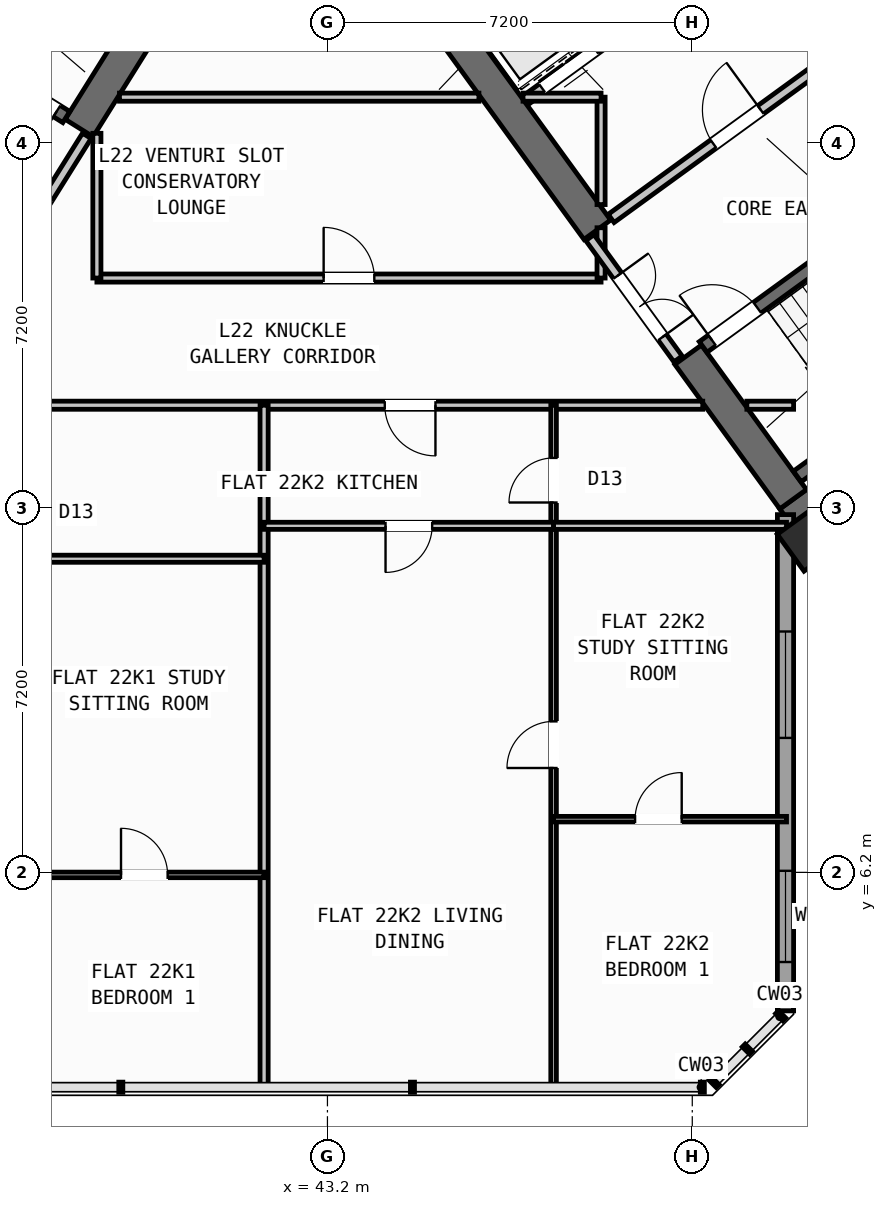
"""IFC4 building model, lengths in metres.
Left out: names, types, materials, properties, quantities, classifications, styles, units other than length and angle.
Written with IfcOpenShell. Run it as: python <this file> out.ifc"""

import sys

from ifc_helpers import new_model, si_unit, direction, frame, frame_2d, origin, origin_2d, place, context, subcontext, project, spatial, rectangle, hollow_rectangle, extrude, source, transform, mapped, element, fill, save


model = new_model("IFC4")
c1 = context("Model", 3, precision=1e-05, world=origin(), true_north=direction((0.0, 1.0)))
c2 = subcontext(c1, "Body", "Model", "MODEL_VIEW")
j1 = project(units=[si_unit("LENGTHUNIT", "METRE"), si_unit("PLANEANGLEUNIT", "RADIAN")], contexts=[c1])
p1 = place(None, origin())
s1 = spatial("IfcSite", under=j1, at=p1, CompositionType="ELEMENT")
p2 = place(p1, origin())
s2 = spatial("IfcBuilding", under=s1, at=p2, CompositionType="ELEMENT")
p3 = place(p2, frame((0.0, 0.0, 90.0)))
s3 = spatial("IfcBuildingStorey", under=s2, at=p3, CompositionType="ELEMENT", Elevation=90.0)
p4 = place(p3, frame((40.168, 23.88, 0.0), z_axis=(0.0, 0.0, 1.0), x_axis=(-0.529893103397, -0.8480644427, 0.0)))
e1 = element("IfcWall", 1, at=p4, inside=s3, PredefinedType="SHEAR", context=c2, shape_type="SweptSolid", body=[
    extrude(rectangle(XDim=3.525, YDim=0.65, at=frame_2d((1.763, 0.0))), origin(), (0.0, 0.0, 1.0), 3.35),
])
p5 = place(p3, frame((52.318, 13.11, 0.0), z_axis=(0.0, 0.0, 1.0), x_axis=(0.809019445368, 0.587781878776, 0.0)))
e2 = element("IfcWall", 2, at=p5, inside=s3, PredefinedType="SHEAR", context=c2, shape_type="SweptSolid", body=[
    extrude(rectangle(XDim=12.44, YDim=0.65, at=frame_2d((6.22, 0.0))), origin(), (0.0, 0.0, 1.0), 3.35),
])
p6 = place(p3, frame((52.39, 13.564, 0.0), z_axis=(0.0, 0.0, 1.0), x_axis=(-0.58779688989, 0.809008539037, 0.0)))
e3 = element("IfcWall", 3, at=p6, inside=s3, PredefinedType="SHEAR", context=c2, shape_type="SweptSolid", body=[
    extrude(rectangle(XDim=3.525, YDim=0.65, at=frame_2d((1.763, 0.0))), origin(), (0.0, 0.0, 1.0), 3.35),
])
p7 = place(p3, frame((48.526, 18.884, 0.0), z_axis=(0.0, 0.0, 1.0), x_axis=(-0.58777996584, 0.809020835181, 0.0)))
e4 = element("IfcWall", 4, at=p7, inside=s3, PredefinedType="SHEAR", context=c2, shape_type="SweptSolid", body=[
    extrude(rectangle(XDim=6.375, YDim=0.65, at=frame_2d((3.188, 0.0))), origin(), (0.0, 0.0, 1.0), 3.35),
])
m1 = source(origin(), c2, "Body", "SweptSolid", [
    extrude(hollow_rectangle(XDim=0.9, YDim=0.9, WallThickness=0.036, at=origin_2d()), origin(), (0.0, 0.0, 1.0), 3.6),
])
p8 = place(p3, frame((52.705, 12.773, 0.0), z_axis=(0.0, 0.0, 1.0), x_axis=(0.809016994375, 0.587785252292, 0.0)))
e5 = element("IfcColumn", 5, at=p8, inside=s3, PredefinedType="COLUMN", context=c2, shape_type="MappedRepresentation", body=[
    mapped(m1, transform((0.0, 0.0, 0.0), scale=1.0)),
])
p9 = place(p3, frame((52.24, 13.261, 0.0), z_axis=(0.0, 0.0, 1.0), x_axis=(0.0, -1.0, 0.0)))
e6 = element("IfcWall", 6, at=p9, inside=s3, PredefinedType="STANDARD", context=c2, shape_type="SweptSolid", body=[
    extrude(rectangle(XDim=9.795, YDim=0.32, at=frame_2d((4.897, 0.0))), origin(), (0.0, 0.0, 1.0), 3.35),
])
p10 = place(p9, frame((2.307, 0.0, 0.8)))
e7 = element("IfcOpeningElement", 7, at=p10, cuts=e6, PredefinedType="OPENING", context=c2, shape_type="SweptSolid", body=[
    extrude(rectangle(XDim=2.1, YDim=1.55, at=frame_2d((1.05, 0.775))), frame((0.0, 0.17, 0.0), z_axis=(0.0, -1.0, 0.0), x_axis=(1.0, 0.0, 0.0)), (0.0, 0.0, 1.0), 0.34),
])
p11 = place(p9, frame((7.03, 0.0, 0.85)))
e8 = element("IfcOpeningElement", 8, at=p11, cuts=e6, PredefinedType="OPENING", context=c2, shape_type="SweptSolid", body=[
    extrude(rectangle(XDim=1.8, YDim=1.5, at=frame_2d((0.9, 0.75))), frame((0.0, 0.17, 0.0), z_axis=(0.0, -1.0, 0.0), x_axis=(1.0, 0.0, 0.0)), (0.0, 0.0, 1.0), 0.34),
])
p12 = place(p3, frame((38.046, 21.108, 0.0), z_axis=(0.0, 0.0, 1.0), x_axis=(-0.848054434086, 0.529909121291, 0.0)))
e9 = element("IfcWall", 9, at=p12, inside=s3, PredefinedType="SHEAR", context=c2, shape_type="SweptSolid", body=[
    extrude(rectangle(XDim=7.33, YDim=0.26, at=frame_2d((3.665, 0.0))), origin(), (0.0, 0.0, 1.0), 3.35),
])
p13 = place(p12, frame((0.22, 0.0, 0.0)))
e10 = element("IfcOpeningElement", 10, at=p13, cuts=e9, PredefinedType="OPENING", context=c2, shape_type="SweptSolid", body=[
    extrude(rectangle(XDim=1.1, YDim=2.1, at=frame_2d((0.55, 1.05))), frame((0.0, 0.14, 0.0), z_axis=(0.0, -1.0, 0.0), x_axis=(1.0, 0.0, 0.0)), (0.0, 0.0, 1.0), 0.28),
])
p14 = place(p3, frame((52.472, 14.013, 0.0), z_axis=(0.0, 0.0, 1.0), x_axis=(0.809028366311, 0.587769599847, 0.0)))
e11 = element("IfcWall", 11, at=p14, inside=s3, PredefinedType="SHEAR", context=c2, shape_type="SweptSolid", body=[
    extrude(rectangle(XDim=7.33, YDim=0.26, at=frame_2d((3.665, 0.0))), origin(), (0.0, 0.0, 1.0), 3.35),
])
p15 = place(p3, frame((50.615, 16.57, 0.0), z_axis=(0.0, 0.0, 1.0), x_axis=(0.809028366311, 0.587769599847, 0.0)))
e12 = element("IfcWall", 12, at=p15, inside=s3, PredefinedType="SHEAR", context=c2, shape_type="SweptSolid", body=[
    extrude(rectangle(XDim=7.33, YDim=0.26, at=frame_2d((3.665, 0.0))), origin(), (0.0, 0.0, 1.0), 3.35),
])
p16 = place(p15, frame((0.22, 0.0, 0.0)))
e13 = element("IfcOpeningElement", 13, at=p16, cuts=e12, PredefinedType="OPENING", context=c2, shape_type="SweptSolid", body=[
    extrude(rectangle(XDim=1.1, YDim=2.1, at=frame_2d((0.55, 1.05))), frame((0.0, 0.14, 0.0), z_axis=(0.0, -1.0, 0.0), x_axis=(1.0, 0.0, 0.0)), (0.0, 0.0, 1.0), 0.28),
])
p17 = place(p3, frame((47.106, 21.437, 0.0), z_axis=(0.0, 0.0, 1.0), x_axis=(0.809012514015, 0.58779141893, 0.0)))
e14 = element("IfcWall", 14, at=p17, inside=s3, PredefinedType="STANDARD", context=c2, shape_type="SweptSolid", body=[
    extrude(rectangle(XDim=3.398, YDim=0.2, at=frame_2d((1.699, 0.0))), origin(), (0.0, 0.0, 1.0), 3.34),
])
p18 = place(p17, frame((0.408, 0.0, 0.0)))
e15 = element("IfcOpeningElement", 15, at=p18, cuts=e14, PredefinedType="OPENING", context=c2, shape_type="SweptSolid", body=[
    extrude(rectangle(XDim=1.3, YDim=2.2, at=frame_2d((0.65, 1.1))), frame((0.0, 0.11, 0.0), z_axis=(0.0, -1.0, 0.0), x_axis=(1.0, 0.0, 0.0)), (0.0, 0.0, 1.0), 0.22),
])
p19 = place(p3, frame((48.799, 19.107, 0.0), z_axis=(0.0, 0.0, 1.0), x_axis=(0.809012959416, 0.587790805897, 0.0)))
e16 = element("IfcWall", 16, at=p19, inside=s3, PredefinedType="STANDARD", context=c2, shape_type="SweptSolid", body=[
    extrude(rectangle(XDim=5.718, YDim=0.2, at=frame_2d((2.859, 0.0))), origin(), (0.0, 0.0, 1.0), 3.34),
])
p20 = place(p19, frame((2.498, 0.0, 0.0)))
e17 = element("IfcOpeningElement", 17, at=p20, cuts=e16, PredefinedType="OPENING", context=c2, shape_type="SweptSolid", body=[
    extrude(rectangle(XDim=1.15, YDim=2.1, at=frame_2d((0.575, 1.05))), frame((0.0, 0.11, 0.0), z_axis=(0.0, -1.0, 0.0), x_axis=(1.0, 0.0, 0.0)), (0.0, 0.0, 1.0), 0.22),
])
p21 = place(p3, frame((38.451, 20.737, 0.0), z_axis=(0.0, 0.0, 1.0), x_axis=(-0.529924799939, -0.848044637038, 0.0)))
e18 = element("IfcWall", 18, at=p21, inside=s3, PredefinedType="STANDARD", context=c2, shape_type="SweptSolid", body=[
    extrude(rectangle(XDim=2.96, YDim=0.2, at=frame_2d((1.48, 0.0))), origin(), (0.0, 0.0, 1.0), 3.34),
])
p22 = place(p21, frame((1.46, 0.0, 0.0)))
e19 = element("IfcOpeningElement", 19, at=p22, cuts=e18, PredefinedType="OPENING", context=c2, shape_type="SweptSolid", body=[
    extrude(rectangle(XDim=0.86, YDim=2.05, at=frame_2d((0.43, 1.025))), frame((0.0, 0.11, 0.0), z_axis=(0.0, -1.0, 0.0), x_axis=(1.0, 0.0, 0.0)), (0.0, 0.0, 1.0), 0.22),
])
p23 = place(p3, frame((35.296, 15.42, 0.0), z_axis=(0.0, 0.0, 1.0), x_axis=(1.0, 0.0, 0.0)))
e20 = element("IfcWall", 20, at=p23, inside=s3, PredefinedType="PARTITIONING", context=c2, shape_type="SweptSolid", body=[
    extrude(rectangle(XDim=15.311, YDim=0.16, at=frame_2d((7.655, 0.0))), origin(), (0.0, 0.0, 1.0), 3.34),
])
p24 = place(p23, frame((0.615, 0.0, 0.0)))
e21 = element("IfcOpeningElement", 21, at=p24, cuts=e20, PredefinedType="OPENING", context=c2, shape_type="SweptSolid", body=[
    extrude(rectangle(XDim=1.0, YDim=2.1, at=frame_2d((0.5, 1.05))), frame((0.0, 0.09, 0.0), z_axis=(0.0, -1.0, 0.0), x_axis=(1.0, 0.0, 0.0)), (0.0, 0.0, 1.0), 0.18),
])
p25 = place(p23, frame((9.035, 0.0, 0.0)))
e22 = element("IfcOpeningElement", 22, at=p25, cuts=e20, PredefinedType="OPENING", context=c2, shape_type="SweptSolid", body=[
    extrude(rectangle(XDim=1.0, YDim=2.1, at=frame_2d((0.5, 1.05))), frame((0.0, 0.09, 0.0), z_axis=(0.0, -1.0, 0.0), x_axis=(1.0, 0.0, 0.0)), (0.0, 0.0, 1.0), 0.18),
])
p26 = place(p3, frame((51.477, 15.42, 0.0), z_axis=(0.0, 0.0, 1.0), x_axis=(1.0, 0.0, 0.0)))
e23 = element("IfcWall", 23, at=p26, inside=s3, PredefinedType="PARTITIONING", context=c2, shape_type="SweptSolid", body=[
    extrude(rectangle(XDim=0.923, YDim=0.16, at=frame_2d((0.461, 0.0))), origin(), (0.0, 0.0, 1.0), 3.34),
])
p27 = place(p3, frame((38.65, 17.93, 0.0), z_axis=(0.0, 0.0, 1.0), x_axis=(1.0, 0.0, 0.0)))
e24 = element("IfcWall", 24, at=p27, inside=s3, PredefinedType="PARTITIONING", context=c2, shape_type="SweptSolid", body=[
    extrude(rectangle(XDim=9.95, YDim=0.16, at=frame_2d((4.975, 0.0))), origin(), (0.0, 0.0, 1.0), 3.34),
])
p28 = place(p27, frame((4.475, 0.0, 0.0)))
e25 = element("IfcOpeningElement", 25, at=p28, cuts=e24, PredefinedType="OPENING", context=c2, shape_type="SweptSolid", body=[
    extrude(rectangle(XDim=1.0, YDim=2.1, at=frame_2d((0.5, 1.05))), frame((0.0, 0.09, 0.0), z_axis=(0.0, -1.0, 0.0), x_axis=(1.0, 0.0, 0.0)), (0.0, 0.0, 1.0), 0.18),
])
p29 = place(p3, frame((38.65, 17.93, 0.0), z_axis=(0.0, 0.0, 1.0), x_axis=(0.0, 1.0, 0.0)))
e26 = element("IfcWall", 26, at=p29, inside=s3, PredefinedType="PARTITIONING", context=c2, shape_type="SweptSolid", body=[
    extrude(rectangle(XDim=2.857, YDim=0.16, at=frame_2d((1.428, 0.0))), origin(), (0.0, 0.0, 1.0), 3.34),
])
p30 = place(p3, frame((48.6, 17.93, 0.0), z_axis=(0.0, 0.0, 1.0), x_axis=(0.0, 1.0, 0.0)))
e27 = element("IfcWall", 27, at=p30, inside=s3, PredefinedType="PARTITIONING", context=c2, shape_type="SweptSolid", body=[
    extrude(rectangle(XDim=0.993, YDim=0.16, at=frame_2d((0.496, 0.0))), origin(), (0.0, 0.0, 1.0), 3.34),
])
p31 = place(p3, frame((48.6, 19.38, 0.0), z_axis=(0.0, 0.0, 1.0), x_axis=(0.0, 1.0, 0.0)))
e28 = element("IfcWall", 28, at=p31, inside=s3, PredefinedType="PARTITIONING", context=c2, shape_type="SweptSolid", body=[
    extrude(rectangle(XDim=2.12, YDim=0.16, at=frame_2d((1.06, 0.0))), origin(), (0.0, 0.0, 1.0), 3.34),
])
p32 = place(p3, frame((39.095, 21.5, 0.0), z_axis=(0.0, 0.0, 1.0), x_axis=(1.0, 0.0, 0.0)))
e29 = element("IfcWall", 29, at=p32, inside=s3, PredefinedType="PARTITIONING", context=c2, shape_type="SweptSolid", body=[
    extrude(rectangle(XDim=7.094, YDim=0.16, at=frame_2d((3.547, 0.0))), origin(), (0.0, 0.0, 1.0), 3.34),
])
p33 = place(p3, frame((47.06, 21.5, 0.0), z_axis=(0.0, 0.0, 1.0), x_axis=(1.0, 0.0, 0.0)))
e30 = element("IfcWall", 30, at=p33, inside=s3, PredefinedType="PARTITIONING", context=c2, shape_type="SweptSolid", body=[
    extrude(rectangle(XDim=1.54, YDim=0.16, at=frame_2d((0.77, 0.0))), origin(), (0.0, 0.0, 1.0), 3.34),
])
p34 = place(p3, frame((50.119, 16.333, 0.0), z_axis=(0.0, 0.0, 1.0), x_axis=(-0.587749856981, 0.809042709391, 0.0)))
e31 = element("IfcWall", 31, at=p34, inside=s3, PredefinedType="STANDARD", context=c2, shape_type="SweptSolid", body=[
    extrude(rectangle(XDim=2.96, YDim=0.2, at=frame_2d((1.48, 0.0))), origin(), (0.0, 0.0, 1.0), 3.34),
])
p35 = place(p34, frame((0.53, 0.0, 0.0)))
e32 = element("IfcOpeningElement", 32, at=p35, cuts=e31, PredefinedType="OPENING", context=c2, shape_type="SweptSolid", body=[
    extrude(rectangle(XDim=1.5, YDim=2.15, at=frame_2d((0.75, 1.075))), frame((0.0, 0.11, 0.0), z_axis=(0.0, -1.0, 0.0), x_axis=(1.0, 0.0, 0.0)), (0.0, 0.0, 1.0), 0.22),
])
p36 = place(p3, frame((41.95, 1.96, 0.0), z_axis=(0.0, 0.0, 1.0), x_axis=(0.0, 1.0, 0.0)))
e33 = element("IfcWall", 33, at=p36, inside=s3, PredefinedType="PARTITIONING", context=c2, shape_type="SweptSolid", body=[
    extrude(rectangle(XDim=13.46, YDim=0.16, at=frame_2d((6.73, 0.0))), origin(), (0.0, 0.0, 1.0), 3.34),
])
p37 = place(p3, frame((37.222, 12.39, 0.0), z_axis=(0.0, 0.0, 1.0), x_axis=(1.0, 0.0, 0.0)))
e34 = element("IfcWall", 34, at=p37, inside=s3, PredefinedType="PLUMBINGWALL", context=c2, shape_type="SweptSolid", body=[
    extrude(rectangle(XDim=4.728, YDim=0.14, at=frame_2d((2.364, 0.0))), origin(), (0.0, 0.0, 1.0), 2.525),
])
p38 = place(p3, frame((37.222, 6.15, 0.0), z_axis=(0.0, 0.0, 1.0), x_axis=(1.0, 0.0, 0.0)))
e35 = element("IfcWall", 35, at=p38, inside=s3, PredefinedType="PARTITIONING", context=c2, shape_type="SweptSolid", body=[
    extrude(rectangle(XDim=4.728, YDim=0.11, at=frame_2d((2.364, 0.0))), origin(), (0.0, 0.0, 1.0), 3.34),
])
p39 = place(p38, frame((1.904, 0.0, 0.0)))
e36 = element("IfcOpeningElement", 36, at=p39, cuts=e35, PredefinedType="OPENING", context=c2, shape_type="SweptSolid", body=[
    extrude(rectangle(XDim=0.92, YDim=2.08, at=frame_2d((0.46, 1.04))), frame((0.0, 0.065, 0.0), z_axis=(0.0, -1.0, 0.0), x_axis=(1.0, 0.0, 0.0)), (0.0, 0.0, 1.0), 0.13),
])
p40 = place(p3, frame((47.663, 1.96, 0.0), z_axis=(0.0, 0.0, 1.0), x_axis=(0.0, 1.0, 0.0)))
e37 = element("IfcWall", 37, at=p40, inside=s3, PredefinedType="PARTITIONING", context=c2, shape_type="SweptSolid", body=[
    extrude(rectangle(XDim=13.46, YDim=0.11, at=frame_2d((6.73, 0.0))), origin(), (0.0, 0.0, 1.0), 3.34),
])
p41 = place(p40, frame((6.3, 0.0, 0.0)))
e38 = element("IfcOpeningElement", 38, at=p41, cuts=e37, PredefinedType="OPENING", context=c2, shape_type="SweptSolid", body=[
    extrude(rectangle(XDim=0.92, YDim=2.08, at=frame_2d((0.46, 1.04))), frame((0.0, 0.065, 0.0), z_axis=(0.0, -1.0, 0.0), x_axis=(1.0, 0.0, 0.0)), (0.0, 0.0, 1.0), 0.13),
])
p42 = place(p40, frame((11.54, 0.0, 0.0)))
e39 = element("IfcOpeningElement", 39, at=p42, cuts=e37, PredefinedType="OPENING", context=c2, shape_type="SweptSolid", body=[
    extrude(rectangle(XDim=0.88, YDim=2.08, at=frame_2d((0.44, 1.04))), frame((0.0, 0.065, 0.0), z_axis=(0.0, -1.0, 0.0), x_axis=(1.0, 0.0, 0.0)), (0.0, 0.0, 1.0), 0.13),
])
p43 = place(p3, frame((41.95, 13.04, 0.0), z_axis=(0.0, 0.0, 1.0), x_axis=(1.0, 0.0, 0.0)))
e40 = element("IfcWall", 40, at=p43, inside=s3, PredefinedType="PLUMBINGWALL", context=c2, shape_type="SweptSolid", body=[
    extrude(rectangle(XDim=5.713, YDim=0.14, at=frame_2d((2.856, 0.0))), origin(), (0.0, 0.0, 1.0), 3.34),
])
p44 = place(p43, frame((2.396, 0.0, 0.0)))
e41 = element("IfcOpeningElement", 41, at=p44, cuts=e40, PredefinedType="OPENING", context=c2, shape_type="SweptSolid", body=[
    extrude(rectangle(XDim=0.92, YDim=2.08, at=frame_2d((0.46, 1.04))), frame((0.0, 0.08, 0.0), z_axis=(0.0, -1.0, 0.0), x_axis=(1.0, 0.0, 0.0)), (0.0, 0.0, 1.0), 0.16),
])
p45 = place(p3, frame((47.663, 13.04, 0.0), z_axis=(0.0, 0.0, 1.0), x_axis=(1.0, 0.0, 0.0)))
e42 = element("IfcWall", 42, at=p45, inside=s3, PredefinedType="PLUMBINGWALL", context=c2, shape_type="SweptSolid", body=[
    extrude(rectangle(XDim=4.597, YDim=0.14, at=frame_2d((2.298, 0.0))), origin(), (0.0, 0.0, 1.0), 2.525),
])
p46 = place(p3, frame((47.663, 7.25, 0.0), z_axis=(0.0, 0.0, 1.0), x_axis=(1.0, 0.0, 0.0)))
e43 = element("IfcWall", 43, at=p46, inside=s3, PredefinedType="PARTITIONING", context=c2, shape_type="SweptSolid", body=[
    extrude(rectangle(XDim=4.597, YDim=0.11, at=frame_2d((2.298, 0.0))), origin(), (0.0, 0.0, 1.0), 3.34),
])
p47 = place(p46, frame((1.608, 0.0, 0.0)))
e44 = element("IfcOpeningElement", 44, at=p47, cuts=e43, PredefinedType="OPENING", context=c2, shape_type="SweptSolid", body=[
    extrude(rectangle(XDim=0.92, YDim=2.08, at=frame_2d((0.46, 1.04))), frame((0.0, 0.065, 0.0), z_axis=(0.0, -1.0, 0.0), x_axis=(1.0, 0.0, 0.0)), (0.0, 0.0, 1.0), 0.13),
])
m2 = source(origin(), c2, "Body", "SweptSolid", [
    extrude(rectangle(XDim=2.1, YDim=1.55, at=frame_2d((1.05, 0.775))), frame((0.0, 0.03, 0.0), z_axis=(0.0, -1.0, 0.0), x_axis=(1.0, 0.0, 0.0)), (0.0, 0.0, 1.0), 0.06),
])
p48 = place(p10, origin())
e45 = element("IfcWindow", 45, at=p48, inside=s3, PartitioningType="SINGLE_PANEL", PredefinedType="WINDOW", context=c2, shape_type="MappedRepresentation", body=[
    mapped(m2, transform((0.0, 0.0, 0.0), scale=1.0)),
])
fill(e7, e45)
m3 = source(origin(), c2, "Body", "SweptSolid", [
    extrude(rectangle(XDim=1.8, YDim=1.5, at=frame_2d((0.9, 0.75))), frame((0.0, 0.03, 0.0), z_axis=(0.0, -1.0, 0.0), x_axis=(1.0, 0.0, 0.0)), (0.0, 0.0, 1.0), 0.06),
])
p49 = place(p11, origin())
e46 = element("IfcWindow", 46, at=p49, inside=s3, PartitioningType="SINGLE_PANEL", PredefinedType="WINDOW", context=c2, shape_type="MappedRepresentation", body=[
    mapped(m3, transform((0.0, 0.0, 0.0), scale=1.0)),
])
fill(e8, e46)
m4 = source(origin(), c2, "Body", "SweptSolid", [
    extrude(rectangle(XDim=1.1, YDim=2.1, at=frame_2d((0.55, 1.05))), frame((0.0, 0.025, 0.0), z_axis=(0.0, -1.0, 0.0), x_axis=(1.0, 0.0, 0.0)), (0.0, 0.0, 1.0), 0.05),
])
p50 = place(p13, origin())
e47 = element("IfcDoor", 47, at=p50, inside=s3, OperationType="SINGLE_SWING_LEFT", PredefinedType="DOOR", context=c2, shape_type="MappedRepresentation", body=[
    mapped(m4, transform((0.0, 0.0, 0.0), scale=1.0)),
])
fill(e10, e47)
p51 = place(p16, origin())
e48 = element("IfcDoor", 48, at=p51, inside=s3, OperationType="SINGLE_SWING_LEFT", PredefinedType="DOOR", context=c2, shape_type="MappedRepresentation", body=[
    mapped(m4, transform((0.0, 0.0, 0.0), scale=1.0)),
])
fill(e13, e48)
m5 = source(origin(), c2, "Body", "SweptSolid", [
    extrude(rectangle(XDim=1.15, YDim=2.1, at=frame_2d((0.575, 1.05))), frame((0.0, 0.025, 0.0), z_axis=(0.0, -1.0, 0.0), x_axis=(1.0, 0.0, 0.0)), (0.0, 0.0, 1.0), 0.05),
])
p52 = place(p20, origin())
e49 = element("IfcDoor", 49, at=p52, inside=s3, OperationType="SINGLE_SWING_RIGHT", PredefinedType="DOOR", context=c2, shape_type="MappedRepresentation", body=[
    mapped(m5, transform((0.0, 0.0, 0.0), scale=1.0)),
])
fill(e17, e49)
m6 = source(origin(), c2, "Body", "SweptSolid", [
    extrude(rectangle(XDim=1.3, YDim=2.2, at=frame_2d((0.65, 1.1))), frame((0.0, 0.025, 0.0), z_axis=(0.0, -1.0, 0.0), x_axis=(1.0, 0.0, 0.0)), (0.0, 0.0, 1.0), 0.05),
])
p53 = place(p18, origin())
e50 = element("IfcDoor", 50, at=p53, inside=s3, OperationType="DOUBLE_DOOR_SLIDING", PredefinedType="DOOR", context=c2, shape_type="MappedRepresentation", body=[
    mapped(m6, transform((0.0, 0.0, 0.0), scale=1.0)),
])
fill(e15, e50)
m7 = source(origin(), c2, "Body", "SweptSolid", [
    extrude(rectangle(XDim=1.0, YDim=2.1, at=frame_2d((0.5, 1.05))), frame((0.0, 0.025, 0.0), z_axis=(0.0, -1.0, 0.0), x_axis=(1.0, 0.0, 0.0)), (0.0, 0.0, 1.0), 0.05),
])
p54 = place(p28, origin())
e51 = element("IfcDoor", 51, at=p54, inside=s3, OperationType="SINGLE_SWING_LEFT", PredefinedType="DOOR", context=c2, shape_type="MappedRepresentation", body=[
    mapped(m7, transform((0.0, 0.0, 0.0), scale=1.0)),
])
fill(e25, e51)
m8 = source(origin(), c2, "Body", "SweptSolid", [
    extrude(rectangle(XDim=1.5, YDim=2.15, at=frame_2d((0.75, 1.075))), frame((0.0, 0.025, 0.0), z_axis=(0.0, -1.0, 0.0), x_axis=(1.0, 0.0, 0.0)), (0.0, 0.0, 1.0), 0.05),
])
p55 = place(p35, frame((1.5, 0.0, 0.0), z_axis=(0.0, 0.0, 1.0), x_axis=(-1.0, 0.0, 0.0)))
e52 = element("IfcDoor", 52, at=p55, inside=s3, OperationType="DOUBLE_DOOR_SINGLE_SWING", PredefinedType="DOOR", context=c2, shape_type="MappedRepresentation", body=[
    mapped(m8, transform((0.0, 0.0, 0.0), scale=1.0)),
])
fill(e32, e52)
m9 = source(origin(), c2, "Body", "SweptSolid", [
    extrude(rectangle(XDim=0.92, YDim=2.08, at=frame_2d((0.46, 1.04))), frame((0.0, 0.025, 0.0), z_axis=(0.0, -1.0, 0.0), x_axis=(1.0, 0.0, 0.0)), (0.0, 0.0, 1.0), 0.05),
])
p56 = place(p39, origin())
e53 = element("IfcDoor", 53, at=p56, inside=s3, OperationType="SINGLE_SWING_LEFT", PredefinedType="DOOR", context=c2, shape_type="MappedRepresentation", body=[
    mapped(m9, transform((0.0, 0.0, 0.0), scale=1.0)),
])
fill(e36, e53)
p57 = place(p41, origin())
e54 = element("IfcDoor", 54, at=p57, inside=s3, OperationType="SINGLE_SWING_LEFT", PredefinedType="DOOR", context=c2, shape_type="MappedRepresentation", body=[
    mapped(m9, transform((0.0, 0.0, 0.0), scale=1.0)),
])
fill(e38, e54)
p58 = place(p47, origin())
e55 = element("IfcDoor", 55, at=p58, inside=s3, OperationType="SINGLE_SWING_RIGHT", PredefinedType="DOOR", context=c2, shape_type="MappedRepresentation", body=[
    mapped(m9, transform((0.0, 0.0, 0.0), scale=1.0)),
])
fill(e44, e55)
p59 = place(p25, frame((1.0, 0.0, 0.0), z_axis=(0.0, 0.0, 1.0), x_axis=(-1.0, 0.0, 0.0)))
e56 = element("IfcDoor", 56, at=p59, inside=s3, OperationType="SINGLE_SWING_LEFT", PredefinedType="DOOR", context=c2, shape_type="MappedRepresentation", body=[
    mapped(m7, transform((0.0, 0.0, 0.0), scale=1.0)),
])
fill(e22, e56)
p60 = place(p44, frame((0.92, 0.0, 0.0), z_axis=(0.0, 0.0, 1.0), x_axis=(-1.0, 0.0, 0.0)))
e57 = element("IfcDoor", 57, at=p60, inside=s3, OperationType="SINGLE_SWING_RIGHT", PredefinedType="DOOR", context=c2, shape_type="MappedRepresentation", body=[
    mapped(m9, transform((0.0, 0.0, 0.0), scale=1.0)),
])
fill(e41, e57)
m10 = source(origin(), c2, "Body", "SweptSolid", [
    extrude(rectangle(XDim=0.88, YDim=2.08, at=frame_2d((0.44, 1.04))), frame((0.0, 0.025, 0.0), z_axis=(0.0, -1.0, 0.0), x_axis=(1.0, 0.0, 0.0)), (0.0, 0.0, 1.0), 0.05),
])
p61 = place(p42, origin())
e58 = element("IfcDoor", 58, at=p61, inside=s3, OperationType="SINGLE_SWING_LEFT", PredefinedType="DOOR", context=c2, shape_type="MappedRepresentation", body=[
    mapped(m10, transform((0.0, 0.0, 0.0), scale=1.0)),
])
fill(e39, e58)
save(model, sys.argv[1])
